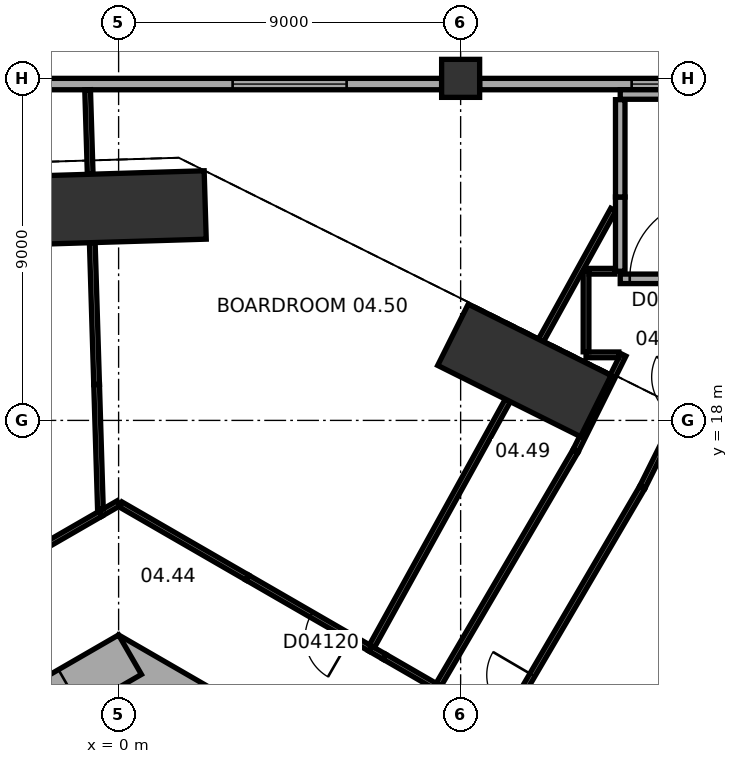
"""IFC4 building model, lengths in metres.
Left out: names, types, materials, properties, quantities, classifications, styles, units other than length and angle.
Written with IfcOpenShell. Run it as: python <this file> out.ifc"""

import sys

from ifc_helpers import new_model, si_unit, direction, frame, frame_2d, origin, origin_2d, place, context, subcontext, project, spatial, rectangle, extrude, element, fill, save


model = new_model("IFC4")
c1 = context("Model", 3, precision=1e-05, world=origin(), true_north=direction((0.0, 1.0)))
c2 = subcontext(c1, "Body", "Model", "MODEL_VIEW")
j1 = project(units=[si_unit("LENGTHUNIT", "METRE"), si_unit("PLANEANGLEUNIT", "RADIAN")], contexts=[c1])
p1 = place(None, origin())
s1 = spatial("IfcSite", under=j1, at=p1, CompositionType="ELEMENT")
p2 = place(p1, origin())
s2 = spatial("IfcBuilding", under=s1, at=p2, CompositionType="ELEMENT")
p3 = place(p2, frame((0.0, 0.0, 29.0)))
s3 = spatial("IfcBuildingStorey", under=s2, at=p3, CompositionType="ELEMENT", Elevation=29.0)
p4 = place(p3, frame((10.677, 19.315, 0.0), z_axis=(0.0, 0.0, 1.0), x_axis=(-0.894935140363, 0.446196251154, 0.0)))
e1 = element("IfcColumn", 1, at=p4, inside=s3, PredefinedType="COLUMN", context=c2, shape_type="SweptSolid", body=[
    extrude(rectangle(XDim=4.2, YDim=1.8, at=origin_2d()), origin(), (0.0, 0.0, 1.0), 5.5),
])
p5 = place(p3, frame((-0.72, 23.577, 0.0), z_axis=(0.0, 0.0, 1.0), x_axis=(-0.999533644135, -0.030536768695, 0.0)))
e2 = element("IfcColumn", 2, at=p5, inside=s3, PredefinedType="COLUMN", context=c2, shape_type="SweptSolid", body=[
    extrude(rectangle(XDim=6.0, YDim=1.8, at=origin_2d()), origin(), (0.0, 0.0, 1.0), 5.5),
])
p6 = place(p3, frame((9.0, 27.0, 0.0), z_axis=(0.0, 0.0, 1.0), x_axis=(1.0, 0.0, 0.0)))
e3 = element("IfcColumn", 3, at=p6, inside=s3, PredefinedType="COLUMN", context=c2, shape_type="SweptSolid", body=[
    extrude(rectangle(XDim=1.0, YDim=1.0, at=origin_2d()), origin(), (0.0, 0.0, 1.0), 5.5),
])
p7 = place(p3, frame((10.4, 5.658, 0.0), z_axis=(0.0, 0.0, 1.0), x_axis=(-0.866021384402, 0.500006961711, 0.0)))
e4 = element("IfcWall", 4, at=p7, inside=s3, PredefinedType="SHEAR", context=c2, shape_type="SweptSolid", body=[
    extrude(rectangle(XDim=12.355, YDim=1.2, at=frame_2d((6.178, 0.0))), origin(), (0.0, 0.0, 1.0), 5.5),
])
p8 = place(p7, frame((2.728, 0.0, 0.0)))
e5 = element("IfcOpeningElement", 5, at=p8, cuts=e4, PredefinedType="OPENING", context=c2, shape_type="SweptSolid", body=[
    extrude(rectangle(XDim=1.1, YDim=2.1, at=frame_2d((0.55, 1.05))), frame((0.0, 0.61, 0.0), z_axis=(0.0, -1.0, 0.0), x_axis=(1.0, 0.0, 0.0)), (0.0, 0.0, 1.0), 1.22),
])
p9 = place(p7, frame((5.328, 0.0, 0.0)))
e6 = element("IfcOpeningElement", 6, at=p9, cuts=e4, PredefinedType="OPENING", context=c2, shape_type="SweptSolid", body=[
    extrude(rectangle(XDim=1.1, YDim=2.1, at=frame_2d((0.55, 1.05))), frame((0.0, 0.61, 0.0), z_axis=(0.0, -1.0, 0.0), x_axis=(1.0, 0.0, 0.0)), (0.0, 0.0, 1.0), 1.22),
])
p10 = place(p7, frame((7.928, 0.0, 0.0)))
e7 = element("IfcOpeningElement", 7, at=p10, cuts=e4, PredefinedType="OPENING", context=c2, shape_type="SweptSolid", body=[
    extrude(rectangle(XDim=1.1, YDim=2.1, at=frame_2d((0.55, 1.05))), frame((0.0, 0.61, 0.0), z_axis=(0.0, -1.0, 0.0), x_axis=(1.0, 0.0, 0.0)), (0.0, 0.0, 1.0), 1.22),
])
p11 = place(p3, frame((0.3, 11.836, 0.0), z_axis=(0.0, 0.0, 1.0), x_axis=(-0.866021384402, -0.500006961711, 0.0)))
e8 = element("IfcWall", 8, at=p11, inside=s3, PredefinedType="SHEAR", context=c2, shape_type="SweptSolid", body=[
    extrude(rectangle(XDim=12.355, YDim=1.2, at=frame_2d((6.178, 0.0))), origin(), (0.0, 0.0, 1.0), 5.5),
])
p12 = place(p11, frame((6.378, 0.0, 0.0)))
e9 = element("IfcOpeningElement", 9, at=p12, cuts=e8, PredefinedType="OPENING", context=c2, shape_type="SweptSolid", body=[
    extrude(rectangle(XDim=1.5, YDim=2.1, at=frame_2d((0.75, 1.05))), frame((0.0, 0.61, 0.0), z_axis=(0.0, -1.0, 0.0), x_axis=(1.0, 0.0, 0.0)), (0.0, 0.0, 1.0), 1.22),
])
p13 = place(p11, frame((1.828, 0.0, 0.0)))
e10 = element("IfcOpeningElement", 10, at=p13, cuts=e8, PredefinedType="OPENING", context=c2, shape_type="SweptSolid", body=[
    extrude(rectangle(XDim=1.1, YDim=2.1, at=frame_2d((0.55, 1.05))), frame((0.0, 0.61, 0.0), z_axis=(0.0, -1.0, 0.0), x_axis=(1.0, 0.0, 0.0)), (0.0, 0.0, 1.0), 1.22),
])
p14 = place(p3, frame((26.5, 26.85, 0.0), z_axis=(0.0, 0.0, 1.0), x_axis=(-1.0, 0.0, 0.0)))
e11 = element("IfcWall", 11, at=p14, inside=s3, PredefinedType="STANDARD", context=c2, shape_type="SweptSolid", body=[
    extrude(rectangle(XDim=17.0, YDim=0.3, at=frame_2d((8.5, 0.0))), origin(), (0.0, 0.0, 1.0), 3.95),
])
p15 = place(p14, frame((3.0, 0.0, 1.0)))
e12 = element("IfcOpeningElement", 12, at=p15, cuts=e11, PredefinedType="OPENING", context=c2, shape_type="SweptSolid", body=[
    extrude(rectangle(XDim=3.0, YDim=2.6, at=frame_2d((1.5, 1.3))), frame((0.0, 0.16, 0.0), z_axis=(0.0, -1.0, 0.0), x_axis=(1.0, 0.0, 0.0)), (0.0, 0.0, 1.0), 0.32),
])
p16 = place(p14, frame((10.0, 0.0, 1.0)))
e13 = element("IfcOpeningElement", 13, at=p16, cuts=e11, PredefinedType="OPENING", context=c2, shape_type="SweptSolid", body=[
    extrude(rectangle(XDim=3.0, YDim=2.6, at=frame_2d((1.5, 1.3))), frame((0.0, 0.16, 0.0), z_axis=(0.0, -1.0, 0.0), x_axis=(1.0, 0.0, 0.0)), (0.0, 0.0, 1.0), 0.32),
])
p17 = place(p3, frame((8.5, 26.85, 0.0), z_axis=(0.0, 0.0, 1.0), x_axis=(-1.0, 0.0, 0.0)))
e14 = element("IfcWall", 14, at=p17, inside=s3, PredefinedType="STANDARD", context=c2, shape_type="SweptSolid", body=[
    extrude(rectangle(XDim=17.0, YDim=0.3, at=frame_2d((8.5, 0.0))), origin(), (0.0, 0.0, 1.0), 3.95),
])
p18 = place(p17, frame((2.5, 0.0, 1.0)))
e15 = element("IfcOpeningElement", 15, at=p18, cuts=e14, PredefinedType="OPENING", context=c2, shape_type="SweptSolid", body=[
    extrude(rectangle(XDim=3.0, YDim=2.6, at=frame_2d((1.5, 1.3))), frame((0.0, 0.16, 0.0), z_axis=(0.0, -1.0, 0.0), x_axis=(1.0, 0.0, 0.0)), (0.0, 0.0, 1.0), 0.32),
])
p19 = place(p17, frame((11.5, 0.0, 1.0)))
e16 = element("IfcOpeningElement", 16, at=p19, cuts=e14, PredefinedType="OPENING", context=c2, shape_type="SweptSolid", body=[
    extrude(rectangle(XDim=3.0, YDim=2.6, at=frame_2d((1.5, 1.3))), frame((0.0, 0.16, 0.0), z_axis=(0.0, -1.0, 0.0), x_axis=(1.0, 0.0, 0.0)), (0.0, 0.0, 1.0), 0.32),
])
p20 = place(p3, frame((8.422, 11.05, 0.0), z_axis=(0.0, 0.0, 1.0), x_axis=(0.50561651199, 0.862758333952, 0.0)))
e17 = element("IfcWall", 17, at=p20, inside=s3, PredefinedType="PARTITIONING", context=c2, shape_type="SweptSolid", body=[
    extrude(rectangle(XDim=7.118, YDim=0.15, at=frame_2d((3.559, 0.0))), origin(), (0.0, 0.0, 1.0), 4.35),
])
p21 = place(p3, frame((6.995, 11.781, 0.0), z_axis=(0.0, 0.0, 1.0), x_axis=(0.866076391369, -0.499911676512, 0.0)))
e18 = element("IfcWall", 18, at=p21, inside=s3, PredefinedType="PARTITIONING", context=c2, shape_type="SweptSolid", body=[
    extrude(rectangle(XDim=1.601, YDim=0.15, at=frame_2d((0.8, 0.0))), origin(), (0.0, 0.0, 1.0), 5.15),
])
p22 = place(p3, frame((6.995, 11.781, 0.0), z_axis=(0.0, 0.0, 1.0), x_axis=(-0.866281716711, 0.49955578997, 0.0)))
e19 = element("IfcWall", 19, at=p22, inside=s3, PredefinedType="PARTITIONING", context=c2, shape_type="SweptSolid", body=[
    extrude(rectangle(XDim=0.423, YDim=0.15, at=frame_2d((0.211, 0.0))), origin(), (0.0, 0.0, 1.0), 5.15),
])
p23 = place(p3, frame((6.629, 11.992, 0.0), z_axis=(0.0, 0.0, 1.0), x_axis=(-0.86599558016, 0.500051652475, 0.0)))
e20 = element("IfcWall", 20, at=p23, inside=s3, PredefinedType="PARTITIONING", context=c2, shape_type="SweptSolid", body=[
    extrude(rectangle(XDim=3.745, YDim=0.15, at=frame_2d((1.872, 0.0))), origin(), (0.0, 0.0, 1.0), 5.15),
])
p24 = place(p23, frame((0.6, 0.0, 0.0)))
e21 = element("IfcOpeningElement", 21, at=p24, cuts=e20, PredefinedType="OPENING", context=c2, shape_type="SweptSolid", body=[
    extrude(rectangle(XDim=1.2, YDim=2.1, at=frame_2d((0.6, 1.05))), frame((0.0, 0.085, 0.0), z_axis=(0.0, -1.0, 0.0), x_axis=(1.0, 0.0, 0.0)), (0.0, 0.0, 1.0), 0.17),
])
p25 = place(p3, frame((6.668, 12.062, 0.0), z_axis=(0.0, 0.0, 1.0), x_axis=(0.483795376692, 0.875181143245, 0.0)))
e22 = element("IfcWall", 22, at=p25, inside=s3, PredefinedType="PARTITIONING", context=c2, shape_type="SweptSolid", body=[
    extrude(rectangle(XDim=7.387, YDim=0.15, at=frame_2d((3.693, 0.0))), origin(), (0.0, 0.0, 1.0), 5.15),
])
p26 = place(p3, frame((19.949, 12.345, 0.0), z_axis=(0.0, 0.0, 1.0), x_axis=(-0.850341306025, -0.526231568102, 0.0)))
e23 = element("IfcWall", 23, at=p26, inside=s3, PredefinedType="MOVABLE", context=c2, shape_type="SweptSolid", body=[
    extrude(rectangle(XDim=7.787, YDim=0.15, at=frame_2d((3.894, 0.0))), origin(), (0.0, 0.0, 1.0), 5.15),
])
p27 = place(p3, frame((3.386, 13.865, 0.0), z_axis=(0.0, 0.0, 1.0), x_axis=(-0.866006051527, 0.500033517596, 0.0)))
e24 = element("IfcWall", 24, at=p27, inside=s3, PredefinedType="PARTITIONING", context=c2, shape_type="SweptSolid", body=[
    extrude(rectangle(XDim=3.85, YDim=0.15, at=frame_2d((1.925, 0.0))), origin(), (0.0, 0.0, 1.0), 5.15),
])
p28 = place(p3, frame((-2.087, 14.615, 0.0), z_axis=(0.0, 0.0, 1.0), x_axis=(0.866006459158, 0.500032811619, 0.0)))
e25 = element("IfcWall", 25, at=p28, inside=s3, PredefinedType="PARTITIONING", context=c2, shape_type="SweptSolid", body=[
    extrude(rectangle(XDim=1.861, YDim=0.15, at=frame_2d((0.931, 0.0))), origin(), (0.0, 0.0, 1.0), 5.15),
])
p29 = place(p3, frame((-0.475, 15.545, 0.0), z_axis=(0.0, 0.0, 1.0), x_axis=(0.865933599817, 0.500158975434, 0.0)))
e26 = element("IfcWall", 26, at=p29, inside=s3, PredefinedType="PARTITIONING", context=c2, shape_type="SweptSolid", body=[
    extrude(rectangle(XDim=0.549, YDim=0.15, at=frame_2d((0.274, 0.0))), origin(), (0.0, 0.0, 1.0), 5.15),
])
p30 = place(p3, frame((13.772, 16.224, 0.0), z_axis=(0.0, 0.0, 1.0), x_axis=(-0.505547889018, -0.862798546539, 0.0)))
e27 = element("IfcWall", 27, at=p30, inside=s3, PredefinedType="PARTITIONING", context=c2, shape_type="SweptSolid", body=[
    extrude(rectangle(XDim=7.156, YDim=0.15, at=frame_2d((3.578, 0.0))), origin(), (0.0, 0.0, 1.0), 5.15),
])
p31 = place(p30, frame((5.706, 0.0, 0.0)))
e28 = element("IfcOpeningElement", 28, at=p31, cuts=e27, PredefinedType="OPENING", context=c2, shape_type="SweptSolid", body=[
    extrude(rectangle(XDim=1.2, YDim=2.1, at=frame_2d((0.6, 1.05))), frame((0.0, 0.085, 0.0), z_axis=(0.0, -1.0, 0.0), x_axis=(1.0, 0.0, 0.0)), (0.0, 0.0, 1.0), 0.17),
])
p32 = place(p3, frame((12.03, 17.209, 0.0), z_axis=(0.0, 0.0, 1.0), x_axis=(0.445753790741, 0.89515560549, 0.0)))
e29 = element("IfcWall", 29, at=p32, inside=s3, PredefinedType="PARTITIONING", context=c2, shape_type="SweptSolid", body=[
    extrude(rectangle(XDim=2.811, YDim=0.15, at=frame_2d((1.405, 0.0))), origin(), (0.0, 0.0, 1.0), 5.15),
])
p33 = place(p3, frame((-0.579, 18.946, 0.0), z_axis=(0.0, 0.0, 1.0), x_axis=(0.030572886356, -0.999532540051, 0.0)))
e30 = element("IfcWall", 30, at=p33, inside=s3, PredefinedType="PARTITIONING", context=c2, shape_type="SweptSolid", body=[
    extrude(rectangle(XDim=3.282, YDim=0.15, at=frame_2d((1.641, 0.0))), origin(), (0.0, 0.0, 1.0), 5.15),
])
p34 = place(p3, frame((-0.579, 18.946, 0.0), z_axis=(0.0, 0.0, 1.0), x_axis=(-0.030471255388, 0.999535643484, 0.0)))
e31 = element("IfcWall", 31, at=p34, inside=s3, PredefinedType="PARTITIONING", context=c2, shape_type="SweptSolid", body=[
    extrude(rectangle(XDim=3.734, YDim=0.15, at=frame_2d((1.867, 0.0))), origin(), (0.0, 0.0, 1.0), 5.15),
])
p35 = place(p3, frame((15.338, 19.365, 0.0), z_axis=(0.0, 0.0, 1.0), x_axis=(-0.44583629063, -0.895114518906, 0.0)))
e32 = element("IfcWall", 32, at=p35, inside=s3, PredefinedType="PARTITIONING", context=c2, shape_type="SweptSolid", body=[
    extrude(rectangle(XDim=3.476, YDim=0.15, at=frame_2d((1.738, 0.0))), origin(), (0.0, 0.0, 1.0), 5.15),
])
p36 = place(p35, frame((0.25, 0.0, 0.0)))
e33 = element("IfcOpeningElement", 33, at=p36, cuts=e32, PredefinedType="OPENING", context=c2, shape_type="SweptSolid", body=[
    extrude(rectangle(XDim=1.2, YDim=2.1, at=frame_2d((0.6, 1.05))), frame((0.0, 0.085, 0.0), z_axis=(0.0, -1.0, 0.0), x_axis=(1.0, 0.0, 0.0)), (0.0, 0.0, 1.0), 0.17),
])
p37 = place(p3, frame((13.163, 19.725, 0.0), z_axis=(0.0, 0.0, 1.0), x_axis=(-1.0, 0.0, 0.0)))
e34 = element("IfcWall", 34, at=p37, inside=s3, PredefinedType="PARTITIONING", context=c2, shape_type="SweptSolid", body=[
    extrude(rectangle(XDim=0.863, YDim=0.15, at=frame_2d((0.432, 0.0))), origin(), (0.0, 0.0, 1.0), 5.15),
])
p38 = place(p3, frame((12.3, 19.805, 0.0), z_axis=(0.0, 0.0, 1.0), x_axis=(0.0, 1.0, 0.0)))
e35 = element("IfcWall", 35, at=p38, inside=s3, PredefinedType="PARTITIONING", context=c2, shape_type="SweptSolid", body=[
    extrude(rectangle(XDim=2.12, YDim=0.15, at=frame_2d((1.06, 0.0))), origin(), (0.0, 0.0, 1.0), 5.15),
])
p39 = place(p3, frame((11.113, 20.104, 0.0), z_axis=(0.0, 0.0, 1.0), x_axis=(0.483823742959, 0.875165461927, 0.0)))
e36 = element("IfcWall", 36, at=p39, inside=s3, PredefinedType="PARTITIONING", context=c2, shape_type="SweptSolid", body=[
    extrude(rectangle(XDim=3.933, YDim=0.15, at=frame_2d((1.967, 0.0))), origin(), (0.0, 0.0, 1.0), 5.15),
])
p40 = place(p3, frame((16.5, 21.725, 0.0), z_axis=(0.0, 0.0, 1.0), x_axis=(-1.0, 0.0, 0.0)))
e37 = element("IfcWall", 37, at=p40, inside=s3, PredefinedType="SOLIDWALL", context=c2, shape_type="SweptSolid", body=[
    extrude(rectangle(XDim=3.3, YDim=0.25, at=frame_2d((1.65, 0.0))), origin(), (0.0, 0.0, 1.0), 5.15),
])
p41 = place(p40, frame((0.95, 0.0, 0.0)))
e38 = element("IfcOpeningElement", 38, at=p41, cuts=e37, PredefinedType="OPENING", context=c2, shape_type="SweptSolid", body=[
    extrude(rectangle(XDim=2.1, YDim=2.4, at=frame_2d((1.05, 1.2))), frame((0.0, 0.135, 0.0), z_axis=(0.0, -1.0, 0.0), x_axis=(1.0, 0.0, 0.0)), (0.0, 0.0, 1.0), 0.27),
])
p42 = place(p3, frame((12.38, 21.925, 0.0), z_axis=(0.0, 0.0, 1.0), x_axis=(1.0, 0.0, 0.0)))
e39 = element("IfcWall", 39, at=p42, inside=s3, PredefinedType="PARTITIONING", context=c2, shape_type="SweptSolid", body=[
    extrude(rectangle(XDim=0.68, YDim=0.15, at=frame_2d((0.34, 0.0))), origin(), (0.0, 0.0, 1.0), 5.15),
])
p43 = place(p3, frame((13.2, 21.925, 0.0), z_axis=(0.0, 0.0, 1.0), x_axis=(0.0, 1.0, 0.0)))
e40 = element("IfcWall", 40, at=p43, inside=s3, PredefinedType="SOLIDWALL", context=c2, shape_type="SweptSolid", body=[
    extrude(rectangle(XDim=1.953, YDim=0.25, at=frame_2d((0.977, 0.0))), origin(), (0.0, 0.0, 1.0), 5.15),
])
p44 = place(p3, frame((13.2, 23.878, 0.0), z_axis=(0.0, 0.0, 1.0), x_axis=(0.0, 1.0, 0.0)))
e41 = element("IfcWall", 41, at=p44, inside=s3, PredefinedType="SOLIDWALL", context=c2, shape_type="SweptSolid", body=[
    extrude(rectangle(XDim=2.562, YDim=0.25, at=frame_2d((1.281, 0.0))), origin(), (0.0, 0.0, 1.0), 5.15),
])
p45 = place(p3, frame((-0.748, 24.477, 0.0), z_axis=(0.0, 0.0, 1.0), x_axis=(-0.030405439098, 0.999537647752, 0.0)))
e42 = element("IfcWall", 42, at=p45, inside=s3, PredefinedType="PARTITIONING", context=c2, shape_type="SweptSolid", body=[
    extrude(rectangle(XDim=2.224, YDim=0.15, at=frame_2d((1.112, 0.0))), origin(), (0.0, 0.0, 1.0), 5.15),
])
p46 = place(p3, frame((24.0, 26.575, 0.0), z_axis=(0.0, 0.0, 1.0), x_axis=(-1.0, 0.0, 0.0)))
e43 = element("IfcWall", 43, at=p46, inside=s3, PredefinedType="SOLIDWALL", context=c2, shape_type="SweptSolid", body=[
    extrude(rectangle(XDim=10.8, YDim=0.25, at=frame_2d((5.4, 0.0))), origin(), (0.0, 0.0, 1.0), 5.15),
])
p47 = place(p16, origin())
e44 = element("IfcWindow", 44, at=p47, inside=s3, PartitioningType="SINGLE_PANEL", PredefinedType="WINDOW", context=c2, shape_type="SweptSolid", body=[
    extrude(rectangle(XDim=3.0, YDim=2.6, at=frame_2d((1.5, 1.3))), frame((0.0, 0.03, 0.0), z_axis=(0.0, -1.0, 0.0), x_axis=(1.0, 0.0, 0.0)), (0.0, 0.0, 1.0), 0.06),
])
fill(e13, e44)
p48 = place(p18, origin())
e45 = element("IfcWindow", 45, at=p48, inside=s3, PartitioningType="SINGLE_PANEL", PredefinedType="WINDOW", context=c2, shape_type="SweptSolid", body=[
    extrude(rectangle(XDim=3.0, YDim=2.6, at=frame_2d((1.5, 1.3))), frame((0.0, 0.03, 0.0), z_axis=(0.0, -1.0, 0.0), x_axis=(1.0, 0.0, 0.0)), (0.0, 0.0, 1.0), 0.06),
])
fill(e15, e45)
p49 = place(p24, origin())
e46 = element("IfcDoor", 46, at=p49, inside=s3, OperationType="SINGLE_SWING_LEFT", PredefinedType="DOOR", context=c2, shape_type="SweptSolid", body=[
    extrude(rectangle(XDim=1.2, YDim=2.1, at=frame_2d((0.6, 1.05))), frame((0.0, 0.025, 0.0), z_axis=(0.0, -1.0, 0.0), x_axis=(1.0, 0.0, 0.0)), (0.0, 0.0, 1.0), 0.05),
])
fill(e21, e46)
p50 = place(p31, origin())
e47 = element("IfcDoor", 47, at=p50, inside=s3, OperationType="SINGLE_SWING_LEFT", PredefinedType="DOOR", context=c2, shape_type="SweptSolid", body=[
    extrude(rectangle(XDim=1.2, YDim=2.1, at=frame_2d((0.6, 1.05))), frame((0.0, 0.025, 0.0), z_axis=(0.0, -1.0, 0.0), x_axis=(1.0, 0.0, 0.0)), (0.0, 0.0, 1.0), 0.05),
])
fill(e28, e47)
p51 = place(p41, frame((2.1, 0.0, 0.0), z_axis=(0.0, 0.0, 1.0), x_axis=(-1.0, 0.0, 0.0)))
e48 = element("IfcDoor", 48, at=p51, inside=s3, OperationType="DOUBLE_DOOR_SINGLE_SWING", PredefinedType="DOOR", context=c2, shape_type="SweptSolid", body=[
    extrude(rectangle(XDim=2.1, YDim=2.4, at=frame_2d((1.05, 1.2))), frame((0.0, 0.025, 0.0), z_axis=(0.0, -1.0, 0.0), x_axis=(1.0, 0.0, 0.0)), (0.0, 0.0, 1.0), 0.05),
])
fill(e38, e48)
save(model, sys.argv[1])
